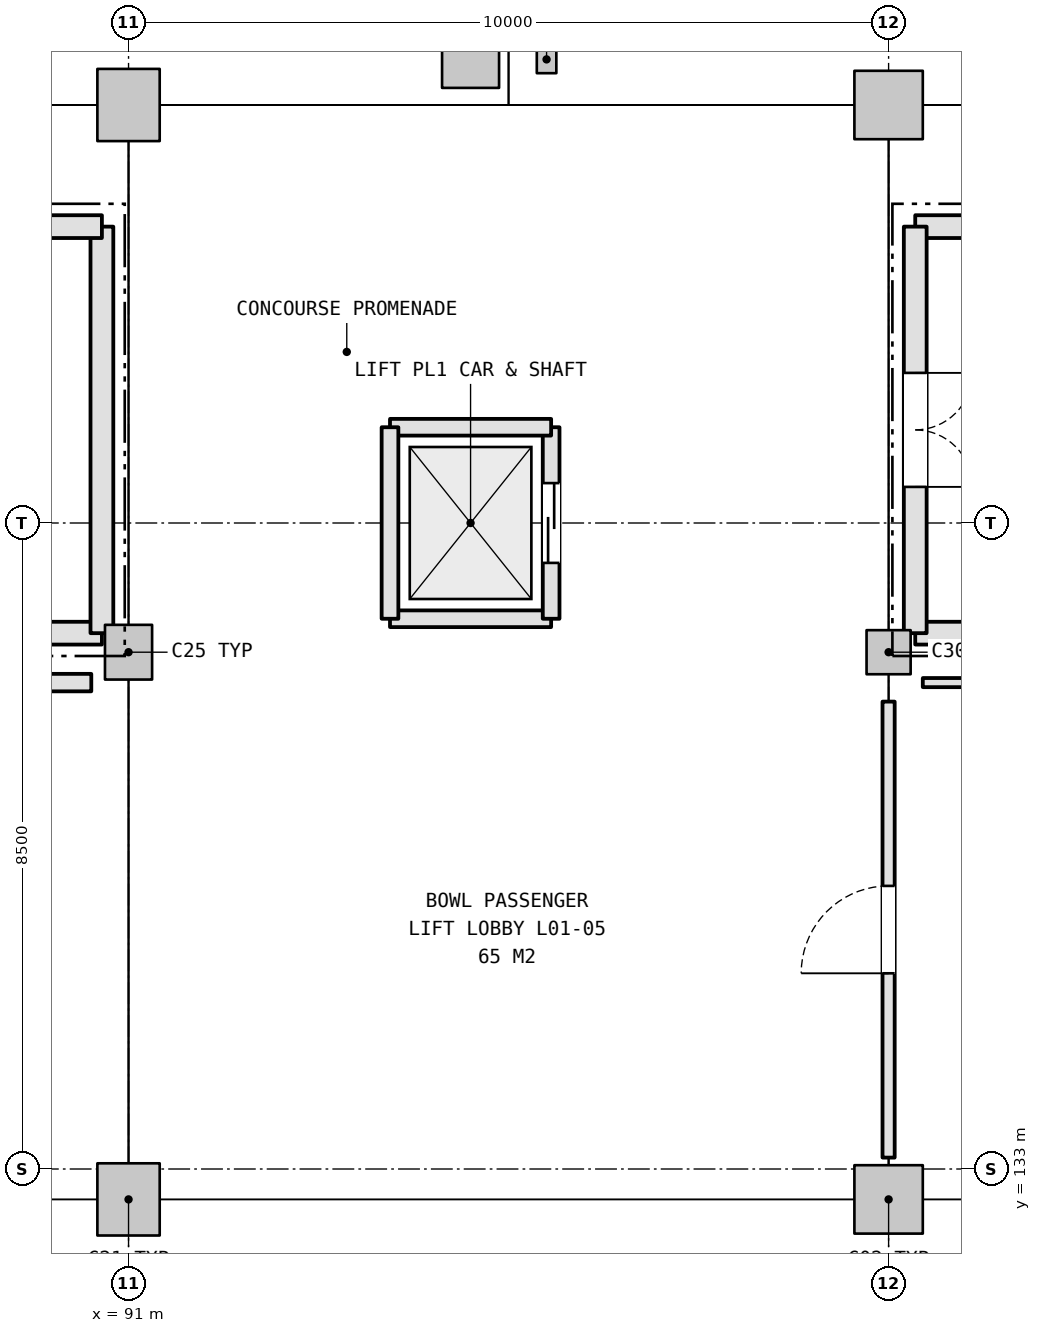
"""IFC4 building model, lengths in metres.
Left out: names, types, materials, properties, quantities, classifications, styles, units other than length and angle.
Written with IfcOpenShell. Run it as: python <this file> out.ifc"""

import sys

from ifc_helpers import new_model, si_unit, direction, frame, frame_2d, origin, origin_2d, place, context, subcontext, project, spatial, rectangle, i_section, extrude, element, fill, save


model = new_model("IFC4")
c1 = context("Model", 3, precision=1e-05, world=origin(), true_north=direction((0.0, 1.0)))
c2 = subcontext(c1, "Body", "Model", "MODEL_VIEW")
j1 = project(units=[si_unit("LENGTHUNIT", "METRE"), si_unit("PLANEANGLEUNIT", "RADIAN")], contexts=[c1])
p1 = place(None, origin())
s1 = spatial("IfcSite", under=j1, at=p1, CompositionType="ELEMENT")
p2 = place(p1, origin())
s2 = spatial("IfcBuilding", under=s1, at=p2, CompositionType="ELEMENT")
p3 = place(p2, frame((0.0, 0.0, 5.4)))
s3 = spatial("IfcBuildingStorey", under=s2, at=p3, CompositionType="ELEMENT", Elevation=5.4)
p4 = place(p3, frame((101.0, 132.6, 0.0), z_axis=(0.0, 0.0, 1.0), x_axis=(1.0, 0.0, 0.0)))
e1 = element("IfcColumn", 1, at=p4, inside=s3, PredefinedType="COLUMN", context=c2, shape_type="SweptSolid", body=[
    extrude(rectangle(XDim=0.9, YDim=0.9, at=origin_2d()), origin(), (0.0, 0.0, 1.0), 5.4),
])
p5 = place(p3, frame((101.0, 139.8, 0.0), z_axis=(0.0, 0.0, 1.0), x_axis=(1.0, 0.0, 0.0)))
e2 = element("IfcColumn", 2, at=p5, inside=s3, PredefinedType="COLUMN", context=c2, shape_type="SweptSolid", body=[
    extrude(rectangle(XDim=0.58, YDim=0.58, at=origin_2d()), origin(), (0.0, 0.0, 1.0), 5.4),
])
p6 = place(p3, frame((101.0, 147.0, 0.0), z_axis=(0.0, 0.0, 1.0), x_axis=(1.0, 0.0, 0.0)))
e3 = element("IfcColumn", 3, at=p6, inside=s3, PredefinedType="COLUMN", context=c2, shape_type="SweptSolid", body=[
    extrude(rectangle(XDim=0.9, YDim=0.9, at=origin_2d()), origin(), (0.0, 0.0, 1.0), 5.4),
])
p7 = place(p3, frame((91.0, 132.6, 0.0), z_axis=(0.0, 0.0, 1.0), x_axis=(1.0, 0.0, 0.0)))
e4 = element("IfcColumn", 4, at=p7, inside=s3, PredefinedType="COLUMN", context=c2, shape_type="SweptSolid", body=[
    extrude(rectangle(XDim=0.82, YDim=0.95, at=origin_2d()), origin(), (0.0, 0.0, 1.0), 5.4),
])
p8 = place(p3, frame((91.0, 139.8, 0.0), z_axis=(0.0, 0.0, 1.0), x_axis=(1.0, 0.0, 0.0)))
e5 = element("IfcColumn", 5, at=p8, inside=s3, PredefinedType="COLUMN", context=c2, shape_type="SweptSolid", body=[
    extrude(rectangle(XDim=0.62, YDim=0.72, at=origin_2d()), origin(), (0.0, 0.0, 1.0), 5.4),
])
p9 = place(p3, frame((91.0, 147.0, 0.0), z_axis=(0.0, 0.0, 1.0), x_axis=(1.0, 0.0, 0.0)))
e6 = element("IfcColumn", 6, at=p9, inside=s3, PredefinedType="COLUMN", context=c2, shape_type="SweptSolid", body=[
    extrude(rectangle(XDim=0.82, YDim=0.95, at=origin_2d()), origin(), (0.0, 0.0, 1.0), 5.4),
])
p10 = place(p3, frame((95.5, 147.6, 0.0), z_axis=(0.0, 0.0, 1.0), x_axis=(1.0, 0.0, 0.0)))
e7 = element("IfcColumn", 7, at=p10, inside=s3, PredefinedType="COLUMN", context=c2, shape_type="SweptSolid", body=[
    extrude(rectangle(XDim=0.75, YDim=0.75, at=origin_2d()), origin(), (0.0, 0.0, 1.0), 5.4),
])
p11 = place(p3, frame((96.5, 147.6, 0.0), z_axis=(0.0, 0.0, 1.0), x_axis=(1.0, 0.0, 0.0)))
e8 = element("IfcColumn", 8, at=p11, inside=s3, PredefinedType="COLUMN", context=c2, shape_type="SweptSolid", body=[
    extrude(i_section(OverallWidth=0.257, OverallDepth=0.363, WebThickness=0.013, FlangeThickness=0.022, FilletRadius=0.015, at=origin_2d()), origin(), (0.0, 0.0, 1.0), 5.4),
])
p12 = place(p3, frame((81.35, 140.05, 0.0), z_axis=(0.0, 0.0, 1.0), x_axis=(1.0, 0.0, 0.0)))
e9 = element("IfcWall", 9, at=p12, inside=s3, PredefinedType="SHEAR", context=c2, shape_type="SweptSolid", body=[
    extrude(rectangle(XDim=9.299, YDim=0.3, at=frame_2d((4.65, 0.0))), origin(), (0.0, 0.0, 1.0), 5.14),
])
p13 = place(p3, frame((90.65, 140.05, 0.0), z_axis=(0.0, 0.0, 1.0), x_axis=(0.0, 1.0, 0.0)))
e10 = element("IfcWall", 10, at=p13, inside=s3, PredefinedType="SHEAR", context=c2, shape_type="SweptSolid", body=[
    extrude(rectangle(XDim=5.349, YDim=0.3, at=frame_2d((2.675, 0.0))), origin(), (0.0, 0.0, 1.0), 5.14),
])
for number, where, z_axis, x_axis in (
    (11, (90.65, 145.4, 0.0), (0.0, 0.0, 1.0), (-1.0, 0.0, 0.0)),
    (12, (101.35, 140.05, 0.0), (0.0, 0.0, 1.0), (1.0, 0.0, 0.0)),
    (13, (110.65, 145.4, 0.0), (0.0, 0.0, 1.0), (-1.0, 0.0, 0.0)),
):
    element("IfcWall", number, at=place(p3, frame(where, z_axis=z_axis, x_axis=x_axis)), inside=s3, PredefinedType="SHEAR", context=c2, shape_type="SweptSolid", body=[
        extrude(rectangle(XDim=9.299, YDim=0.3, at=frame_2d((4.65, 0.0))), origin(), (0.0, 0.0, 1.0), 5.14),
    ])
p14 = place(p3, frame((101.35, 145.4, 0.0), z_axis=(0.0, 0.0, 1.0), x_axis=(0.0, -1.0, 0.0)))
e14 = element("IfcWall", 14, at=p14, inside=s3, PredefinedType="SHEAR", context=c2, shape_type="SweptSolid", body=[
    extrude(rectangle(XDim=5.349, YDim=0.3, at=frame_2d((2.675, 0.0))), origin(), (0.0, 0.0, 1.0), 5.14),
])
p15 = place(p14, frame((1.925, 0.0, 0.0)))
e15 = element("IfcOpeningElement", 15, at=p15, cuts=e14, PredefinedType="OPENING", context=c2, shape_type="SweptSolid", body=[
    extrude(rectangle(XDim=1.5, YDim=2.2, at=frame_2d((0.75, 1.1))), frame((0.0, 0.16, 0.0), z_axis=(0.0, -1.0, 0.0), x_axis=(1.0, 0.0, 0.0)), (0.0, 0.0, 1.0), 0.32),
])
p16 = place(p3, frame((94.44, 140.24, 0.0), z_axis=(0.0, 0.0, 1.0), x_axis=(1.0, 0.0, 0.0)))
e16 = element("IfcWall", 16, at=p16, inside=s3, PredefinedType="SHEAR", context=c2, shape_type="SweptSolid", body=[
    extrude(rectangle(XDim=2.12, YDim=0.22, at=frame_2d((1.06, 0.0))), origin(), (0.0, 0.0, 1.0), 5.14),
])
p17 = place(p3, frame((96.56, 140.24, 0.0), z_axis=(0.0, 0.0, 1.0), x_axis=(0.0, 1.0, 0.0)))
e17 = element("IfcWall", 17, at=p17, inside=s3, PredefinedType="SHEAR", context=c2, shape_type="SweptSolid", body=[
    extrude(rectangle(XDim=2.52, YDim=0.22, at=frame_2d((1.26, 0.0))), origin(), (0.0, 0.0, 1.0), 5.14),
])
p18 = place(p17, frame((0.735, 0.0, 0.0)))
e18 = element("IfcOpeningElement", 18, at=p18, cuts=e17, PredefinedType="OPENING", context=c2, shape_type="SweptSolid", body=[
    extrude(rectangle(XDim=1.05, YDim=2.15, at=frame_2d((0.525, 1.075))), frame((0.0, 0.12, 0.0), z_axis=(0.0, -1.0, 0.0), x_axis=(1.0, 0.0, 0.0)), (0.0, 0.0, 1.0), 0.24),
])
p19 = place(p3, frame((96.56, 142.76, 0.0), z_axis=(0.0, 0.0, 1.0), x_axis=(-1.0, 0.0, 0.0)))
e19 = element("IfcWall", 19, at=p19, inside=s3, PredefinedType="SHEAR", context=c2, shape_type="SweptSolid", body=[
    extrude(rectangle(XDim=2.12, YDim=0.22, at=frame_2d((1.06, 0.0))), origin(), (0.0, 0.0, 1.0), 5.14),
])
p20 = place(p3, frame((94.44, 142.76, 0.0), z_axis=(0.0, 0.0, 1.0), x_axis=(0.0, -1.0, 0.0)))
e20 = element("IfcWall", 20, at=p20, inside=s3, PredefinedType="SHEAR", context=c2, shape_type="SweptSolid", body=[
    extrude(rectangle(XDim=2.52, YDim=0.22, at=frame_2d((1.26, 0.0))), origin(), (0.0, 0.0, 1.0), 5.14),
])
p21 = place(p3, frame((101.0, 133.15, 0.0), z_axis=(0.0, 0.0, 1.0), x_axis=(0.0, 1.0, 0.0)))
e21 = element("IfcWall", 21, at=p21, inside=s3, PredefinedType="PARTITIONING", context=c2, shape_type="SweptSolid", body=[
    extrude(rectangle(XDim=6.0, YDim=0.16, at=frame_2d((3.0, 0.0))), origin(), (0.0, 0.0, 1.0), 4.385),
])
p22 = place(p21, frame((2.425, 0.0, 0.0)))
e22 = element("IfcOpeningElement", 22, at=p22, cuts=e21, PredefinedType="OPENING", context=c2, shape_type="SweptSolid", body=[
    extrude(rectangle(XDim=1.15, YDim=2.2, at=frame_2d((0.575, 1.1))), frame((0.0, 0.09, 0.0), z_axis=(0.0, -1.0, 0.0), x_axis=(1.0, 0.0, 0.0)), (0.0, 0.0, 1.0), 0.18),
])
p23 = place(p3, frame((101.45, 139.4, 0.0), z_axis=(0.0, 0.0, 1.0), x_axis=(1.0, 0.0, 0.0)))
e23 = element("IfcWall", 23, at=p23, inside=s3, PredefinedType="PARTITIONING", context=c2, shape_type="SweptSolid", body=[
    extrude(rectangle(XDim=9.06, YDim=0.12, at=frame_2d((4.53, 0.0))), origin(), (0.0, 0.0, 1.0), 5.12),
])
p24 = place(p3, frame((81.45, 139.4, 0.0), z_axis=(0.0, 0.0, 1.0), x_axis=(1.0, 0.0, 0.0)))
e24 = element("IfcWall", 24, at=p24, inside=s3, PredefinedType="PLUMBINGWALL", context=c2, shape_type="SweptSolid", body=[
    extrude(rectangle(XDim=9.06, YDim=0.23, at=frame_2d((4.53, 0.0))), origin(), (0.0, 0.0, 1.0), 5.12),
])
p25 = place(p15, origin())
e25 = element("IfcDoor", 25, at=p25, inside=s3, OperationType="DOUBLE_DOOR_SINGLE_SWING", PredefinedType="DOOR", context=c2, shape_type="SweptSolid", body=[
    extrude(rectangle(XDim=1.5, YDim=2.2, at=frame_2d((0.75, 1.1))), frame((0.0, 0.025, 0.0), z_axis=(0.0, -1.0, 0.0), x_axis=(1.0, 0.0, 0.0)), (0.0, 0.0, 1.0), 0.05),
])
fill(e15, e25)
p26 = place(p18, origin())
e26 = element("IfcDoor", 26, at=p26, inside=s3, OperationType="DOUBLE_DOOR_SLIDING", PredefinedType="DOOR", context=c2, shape_type="SweptSolid", body=[
    extrude(rectangle(XDim=1.05, YDim=2.15, at=frame_2d((0.525, 1.075))), frame((0.0, 0.025, 0.0), z_axis=(0.0, -1.0, 0.0), x_axis=(1.0, 0.0, 0.0)), (0.0, 0.0, 1.0), 0.05),
])
fill(e18, e26)
p27 = place(p22, origin())
e27 = element("IfcDoor", 27, at=p27, inside=s3, OperationType="SINGLE_SWING_LEFT", PredefinedType="DOOR", context=c2, shape_type="SweptSolid", body=[
    extrude(rectangle(XDim=1.15, YDim=2.2, at=frame_2d((0.575, 1.1))), frame((0.0, 0.025, 0.0), z_axis=(0.0, -1.0, 0.0), x_axis=(1.0, 0.0, 0.0)), (0.0, 0.0, 1.0), 0.05),
])
fill(e22, e27)
save(model, sys.argv[1])
